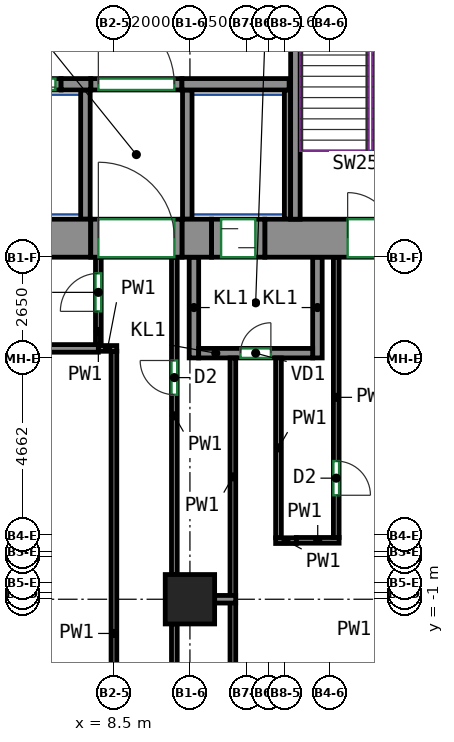
"""IFC4 building model, lengths in metres.
Left out: names, types, materials, properties, quantities, classifications, styles, units other than length and angle.
Written with IfcOpenShell. Run it as: python <this file> out.ifc"""

import sys

from ifc_helpers import new_model, si_unit, direction, frame, frame_2d, origin, origin_2d, place, context, subcontext, project, spatial, rectangle, extrude, source, transform, mapped, element, fill, save


model = new_model("IFC4")
c1 = context("Model", 3, precision=1e-05, world=origin(), true_north=direction((0.0, 1.0)))
c2 = subcontext(c1, "Body", "Model", "MODEL_VIEW")
j1 = project(units=[si_unit("LENGTHUNIT", "METRE"), si_unit("PLANEANGLEUNIT", "RADIAN")], contexts=[c1])
p1 = place(None, origin())
s1 = spatial("IfcSite", under=j1, at=p1, CompositionType="ELEMENT")
p2 = place(p1, origin())
s2 = spatial("IfcBuilding", under=s1, at=p2, CompositionType="ELEMENT")
p3 = place(p2, frame((0.0, 0.0, 47.0)))
s3 = spatial("IfcBuildingStorey", under=s2, at=p3, CompositionType="ELEMENT", Elevation=47.0)
m1 = source(origin(), c2, "Body", "SweptSolid", [
    extrude(rectangle(XDim=1.3, YDim=1.3, at=origin_2d()), origin(), (0.0, 0.0, 1.0), 3.72),
])
p4 = place(p3, frame((10.5, -1.0, 0.0), z_axis=(0.0, 0.0, 1.0), x_axis=(1.0, 0.0, 0.0)))
e1 = element("IfcColumn", 1, at=p4, inside=s3, PredefinedType="COLUMN", context=c2, shape_type="MappedRepresentation", body=[
    mapped(m1, transform((0.0, 0.0, 0.0))),
])
m2 = source(origin(), c2, "Body", "SweptSolid", [
    extrude(rectangle(XDim=14.18, YDim=1.0, at=frame_2d((7.09, 0.0))), origin(), (0.0, 0.0, 1.0), 3.72),
])
p5 = place(p3, frame((-6.29, 8.5, 0.0), z_axis=(0.0, 0.0, 1.0), x_axis=(1.0, 0.0, 0.0)))
e2 = element("IfcWall", 2, at=p5, inside=s3, PredefinedType="SHEAR", context=c2, shape_type="MappedRepresentation", body=[
    mapped(m2, transform((0.0, 0.0, 0.0))),
])
m3 = source(origin(), c2, "Body", "SweptSolid", [
    extrude(rectangle(XDim=0.78, YDim=1.0, at=frame_2d((0.39, 0.0))), origin(), (0.0, 0.0, 1.0), 3.72),
])
p6 = place(p3, frame((10.29, 8.5, 0.0), z_axis=(0.0, 0.0, 1.0), x_axis=(1.0, 0.0, 0.0)))
e3 = element("IfcWall", 3, at=p6, inside=s3, PredefinedType="SHEAR", context=c2, shape_type="MappedRepresentation", body=[
    mapped(m3, transform((0.0, 0.0, 0.0))),
])
m4 = source(origin(), c2, "Body", "SweptSolid", [
    extrude(rectangle(XDim=5.63, YDim=1.0, at=frame_2d((2.815, 0.0))), origin(), (0.0, 0.0, 1.0), 3.72),
])
p7 = place(p3, frame((12.47, 8.5, 0.0), z_axis=(0.0, 0.0, 1.0), x_axis=(1.0, 0.0, 0.0)))
e4 = element("IfcWall", 4, at=p7, inside=s3, PredefinedType="SHEAR", context=c2, shape_type="MappedRepresentation", body=[
    mapped(m4, transform((0.0, 0.0, 0.0))),
])
p8 = place(p7, frame((2.18, 0.0, 0.0)))
e5 = element("IfcOpeningElement", 5, at=p8, cuts=e4, PredefinedType="OPENING", context=c2, shape_type="SweptSolid", body=[
    extrude(rectangle(XDim=1.2, YDim=2.1, at=frame_2d((0.6, 1.05))), frame((0.0, 0.51, 0.0), z_axis=(0.0, -1.0, 0.0), x_axis=(1.0, 0.0, 0.0)), (0.0, 0.0, 1.0), 1.02),
])
m5 = source(origin(), c2, "Body", "SweptSolid", [
    extrude(rectangle(XDim=7.75, YDim=0.25, at=frame_2d((3.875, 0.0))), origin(), (0.0, 0.0, 1.0), 3.72),
])
p9 = place(p3, frame((13.275, 9.0, 0.0), z_axis=(0.0, 0.0, 1.0), x_axis=(0.0, 1.0, 0.0)))
e6 = element("IfcWall", 6, at=p9, inside=s3, PredefinedType="SHEAR", context=c2, shape_type="MappedRepresentation", body=[
    mapped(m5, transform((0.0, 0.0, 0.0))),
])
m6 = source(origin(), c2, "Body", "SweptSolid", [
    extrude(rectangle(XDim=0.78, YDim=0.3, at=frame_2d((0.39, 0.0))), origin(), (0.0, 0.0, 1.0), 3.72),
])
p10 = place(p3, frame((7.11, 12.55, 0.0), z_axis=(0.0, 0.0, 1.0), x_axis=(1.0, 0.0, 0.0)))
e7 = element("IfcWall", 7, at=p10, inside=s3, PredefinedType="SHEAR", context=c2, shape_type="MappedRepresentation", body=[
    mapped(m6, transform((0.0, 0.0, 0.0))),
])
m7 = source(origin(), c2, "Body", "SweptSolid", [
    extrude(rectangle(XDim=2.82, YDim=0.3, at=frame_2d((1.41, 0.0))), origin(), (0.0, 0.0, 1.0), 3.72),
])
p11 = place(p3, frame((10.29, 12.55, 0.0), z_axis=(0.0, 0.0, 1.0), x_axis=(1.0, 0.0, 0.0)))
e8 = element("IfcWall", 8, at=p11, inside=s3, PredefinedType="SHEAR", context=c2, shape_type="MappedRepresentation", body=[
    mapped(m7, transform((0.0, 0.0, 0.0))),
])
m8 = source(origin(), c2, "Body", "SweptSolid", [
    extrude(rectangle(XDim=1.4, YDim=0.3, at=frame_2d((0.7, 0.0))), origin(), (0.0, 0.0, 1.0), 3.72),
])
p12 = place(p3, frame((5.71, 12.55, 0.0), z_axis=(0.0, 0.0, 1.0), x_axis=(1.0, 0.0, 0.0)))
e9 = element("IfcWall", 9, at=p12, inside=s3, PredefinedType="PARTITIONING", context=c2, shape_type="MappedRepresentation", body=[
    mapped(m8, transform((0.0, 0.0, 0.0))),
])
p13 = place(p12, frame((0.15, 0.0, 0.0)))
e10 = element("IfcOpeningElement", 10, at=p13, cuts=e9, PredefinedType="OPENING", context=c2, shape_type="SweptSolid", body=[
    extrude(rectangle(XDim=1.1, YDim=2.1, at=frame_2d((0.55, 1.05))), frame((0.0, 0.16, 0.0), z_axis=(0.0, -1.0, 0.0), x_axis=(1.0, 0.0, 0.0)), (0.0, 0.0, 1.0), 0.32),
])
m9 = source(origin(), c2, "Body", "SweptSolid", [
    extrude(rectangle(XDim=2.4, YDim=0.3, at=frame_2d((1.2, 0.0))), origin(), (0.0, 0.0, 1.0), 3.72),
])
p14 = place(p3, frame((7.89, 12.55, 0.0), z_axis=(0.0, 0.0, 1.0), x_axis=(1.0, 0.0, 0.0)))
e11 = element("IfcWall", 11, at=p14, inside=s3, PredefinedType="PARTITIONING", context=c2, shape_type="MappedRepresentation", body=[
    mapped(m9, transform((0.0, 0.0, 0.0))),
])
p15 = place(p14, frame((0.2, 0.0, 0.0)))
e12 = element("IfcOpeningElement", 12, at=p15, cuts=e11, PredefinedType="OPENING", context=c2, shape_type="SweptSolid", body=[
    extrude(rectangle(XDim=2.0, YDim=2.1, at=frame_2d((1.0, 1.05))), frame((0.0, 0.16, 0.0), z_axis=(0.0, -1.0, 0.0), x_axis=(1.0, 0.0, 0.0)), (0.0, 0.0, 1.0), 0.32),
])
m10 = source(origin(), c2, "Body", "SweptSolid", [
    extrude(rectangle(XDim=2.65, YDim=0.25, at=frame_2d((1.325, 0.0))), origin(), (0.0, 0.0, 1.0), 3.72),
])
for number, where, z_axis, x_axis in (
    (13, (10.605, 5.35, 0.0), (0.0, 0.0, 1.0), (0.0, 1.0, 0.0)),
    (14, (13.855, 5.35, 0.0), (0.0, 0.0, 1.0), (0.0, 1.0, 0.0)),
):
    element("IfcWall", number, at=place(p3, frame(where, z_axis=z_axis, x_axis=x_axis)), inside=s3, PredefinedType="PARTITIONING", context=c2, shape_type="MappedRepresentation", body=[
        mapped(m10, transform((0.0, 0.0, 0.0))),
    ])
m11 = source(origin(), c2, "Body", "SweptSolid", [
    extrude(rectangle(XDim=3.0, YDim=0.25, at=frame_2d((1.5, 0.0))), origin(), (0.0, 0.0, 1.0), 3.72),
])
p16 = place(p3, frame((10.73, 5.475, 0.0), z_axis=(0.0, 0.0, 1.0), x_axis=(1.0, 0.0, 0.0)))
e15 = element("IfcWall", 15, at=p16, inside=s3, PredefinedType="PARTITIONING", context=c2, shape_type="MappedRepresentation", body=[
    mapped(m11, transform((0.0, 0.0, 0.0))),
])
p17 = place(p16, frame((1.1, 0.0, 0.0)))
e16 = element("IfcOpeningElement", 16, at=p17, cuts=e15, PredefinedType="OPENING", context=c2, shape_type="SweptSolid", body=[
    extrude(rectangle(XDim=0.8, YDim=2.0, at=frame_2d((0.4, 1.0))), frame((0.0, 0.135, 0.0), z_axis=(0.0, -1.0, 0.0), x_axis=(1.0, 0.0, 0.0)), (0.0, 0.0, 1.0), 0.27),
])
m12 = source(origin(), c2, "Body", "SweptSolid", [
    extrude(rectangle(XDim=3.4, YDim=0.25, at=frame_2d((1.7, 0.0))), origin(), (0.0, 0.0, 1.0), 3.72),
])
p18 = place(p3, frame((10.43, 9.0, 0.0), z_axis=(0.0, 0.0, 1.0), x_axis=(0.0, 1.0, 0.0)))
e17 = element("IfcWall", 17, at=p18, inside=s3, PredefinedType="PARTITIONING", context=c2, shape_type="MappedRepresentation", body=[
    mapped(m12, transform((0.0, 0.0, 0.0))),
])
m13 = source(origin(), c2, "Body", "SweptSolid", [
    extrude(rectangle(XDim=3.4, YDim=0.165, at=frame_2d((1.7, 0.0))), origin(), (0.0, 0.0, 1.0), 3.72),
])
p19 = place(p3, frame((13.067, 9.0, 0.0), z_axis=(0.0, 0.0, 1.0), x_axis=(0.0, 1.0, 0.0)))
e18 = element("IfcWall", 18, at=p19, inside=s3, PredefinedType="PARTITIONING", context=c2, shape_type="MappedRepresentation", body=[
    mapped(m13, transform((0.0, 0.0, 0.0))),
])
p20 = place(p3, frame((7.75, 9.0, 0.0), z_axis=(0.0, 0.0, 1.0), x_axis=(0.0, 1.0, 0.0)))
e19 = element("IfcWall", 19, at=p20, inside=s3, PredefinedType="PARTITIONING", context=c2, shape_type="MappedRepresentation", body=[
    mapped(m12, transform((0.0, 0.0, 0.0))),
])
m14 = source(origin(), c2, "Body", "SweptSolid", [
    extrude(rectangle(XDim=2.4, YDim=1.0, at=frame_2d((1.2, 0.0))), origin(), (0.0, 0.0, 1.0), 2.7),
])
p21 = place(p3, frame((7.89, 8.5, 0.0), z_axis=(0.0, 0.0, 1.0), x_axis=(1.0, 0.0, 0.0)))
e20 = element("IfcWall", 20, at=p21, inside=s3, PredefinedType="PARTITIONING", context=c2, shape_type="MappedRepresentation", body=[
    mapped(m14, transform((0.0, 0.0, 0.0))),
])
p22 = place(p21, frame((0.2, 0.0, 0.0)))
e21 = element("IfcOpeningElement", 21, at=p22, cuts=e20, PredefinedType="OPENING", context=c2, shape_type="SweptSolid", body=[
    extrude(rectangle(XDim=2.0, YDim=2.1, at=frame_2d((1.0, 1.05))), frame((0.0, 0.51, 0.0), z_axis=(0.0, -1.0, 0.0), x_axis=(1.0, 0.0, 0.0)), (0.0, 0.0, 1.0), 1.02),
])
m15 = source(origin(), c2, "Body", "SweptSolid", [
    extrude(rectangle(XDim=1.4, YDim=1.0, at=frame_2d((0.7, 0.0))), origin(), (0.0, 0.0, 1.0), 2.7),
])
p23 = place(p3, frame((11.07, 8.5, 0.0), z_axis=(0.0, 0.0, 1.0), x_axis=(1.0, 0.0, 0.0)))
e22 = element("IfcWall", 22, at=p23, inside=s3, PredefinedType="PARTITIONING", context=c2, shape_type="MappedRepresentation", body=[
    mapped(m15, transform((0.0, 0.0, 0.0))),
])
p24 = place(p23, frame((0.25, 0.0, 0.0)))
e23 = element("IfcOpeningElement", 23, at=p24, cuts=e22, PredefinedType="OPENING", context=c2, shape_type="SweptSolid", body=[
    extrude(rectangle(XDim=0.9, YDim=2.1, at=frame_2d((0.45, 1.05))), frame((0.0, 0.51, 0.0), z_axis=(0.0, -1.0, 0.0), x_axis=(1.0, 0.0, 0.0)), (0.0, 0.0, 1.0), 1.02),
])
p25 = place(p3, frame((10.09, -9.35, 0.0), z_axis=(0.0, 0.0, 1.0), x_axis=(0.0, 1.0, 0.0)))
e24 = element("IfcWall", 24, at=p25, inside=s3, PredefinedType="PARTITIONING", context=c2, shape_type="SweptSolid", body=[
    extrude(rectangle(XDim=7.7, YDim=0.15, at=frame_2d((3.85, 0.0))), origin(), (0.0, 0.0, 1.0), 3.72),
])
p26 = place(p3, frame((11.63, -14.125, 0.0), z_axis=(0.0, 0.0, 1.0), x_axis=(0.0, 1.0, 0.0)))
e25 = element("IfcWall", 25, at=p26, inside=s3, PredefinedType="PARTITIONING", context=c2, shape_type="SweptSolid", body=[
    extrude(rectangle(XDim=13.035, YDim=0.15, at=frame_2d((6.518, 0.0))), origin(), (0.0, 0.0, 1.0), 3.72),
])
p27 = place(p26, frame((2.507, 0.0, 0.0)))
e26 = element("IfcOpeningElement", 26, at=p27, cuts=e25, PredefinedType="OPENING", context=c2, shape_type="SweptSolid", body=[
    extrude(rectangle(XDim=0.9, YDim=2.1, at=frame_2d((0.45, 1.05))), frame((0.0, 0.085, 0.0), z_axis=(0.0, -1.0, 0.0), x_axis=(1.0, 0.0, 0.0)), (0.0, 0.0, 1.0), 0.17),
])
p28 = place(p3, frame((10.09, -0.35, 0.0), z_axis=(0.0, 0.0, 1.0), x_axis=(0.0, 1.0, 0.0)))
e27 = element("IfcWall", 27, at=p28, inside=s3, PredefinedType="PARTITIONING", context=c2, shape_type="SweptSolid", body=[
    extrude(rectangle(XDim=8.35, YDim=0.15, at=frame_2d((4.175, 0.0))), origin(), (0.0, 0.0, 1.0), 3.72),
])
p29 = place(p28, frame((4.732, 0.0, 0.0)))
e28 = element("IfcOpeningElement", 28, at=p29, cuts=e27, PredefinedType="OPENING", context=c2, shape_type="SweptSolid", body=[
    extrude(rectangle(XDim=0.9, YDim=2.1, at=frame_2d((0.45, 1.05))), frame((0.0, 0.085, 0.0), z_axis=(0.0, -1.0, 0.0), x_axis=(1.0, 0.0, 0.0)), (0.0, 0.0, 1.0), 0.17),
])
p30 = place(p3, frame((11.63, -0.91, 0.0), z_axis=(0.0, 0.0, 1.0), x_axis=(0.0, 1.0, 0.0)))
e29 = element("IfcWall", 29, at=p30, inside=s3, PredefinedType="PARTITIONING", context=c2, shape_type="SweptSolid", body=[
    extrude(rectangle(XDim=6.26, YDim=0.15, at=frame_2d((3.13, 0.0))), origin(), (0.0, 0.0, 1.0), 3.72),
])
p31 = place(p3, frame((12.83, 0.617, 0.0), z_axis=(0.0, 0.0, 1.0), x_axis=(0.0, 1.0, 0.0)))
e30 = element("IfcWall", 30, at=p31, inside=s3, PredefinedType="PARTITIONING", context=c2, shape_type="SweptSolid", body=[
    extrude(rectangle(XDim=4.733, YDim=0.15, at=frame_2d((2.367, 0.0))), origin(), (0.0, 0.0, 1.0), 3.72),
])
p32 = place(p3, frame((13.3, 0.542, 0.0), z_axis=(0.0, 0.0, 1.0), x_axis=(-1.0, 0.0, 0.0)))
e31 = element("IfcWall", 31, at=p32, inside=s3, PredefinedType="PARTITIONING", context=c2, shape_type="SweptSolid", body=[
    extrude(rectangle(XDim=0.545, YDim=0.15, at=frame_2d((0.272, 0.0))), origin(), (0.0, 0.0, 1.0), 3.72),
])
p33 = place(p3, frame((13.3, 0.55, 0.0), z_axis=(0.0, 0.0, 1.0), x_axis=(1.0, 0.0, 0.0)))
e32 = element("IfcWall", 32, at=p33, inside=s3, PredefinedType="PARTITIONING", context=c2, shape_type="SweptSolid", body=[
    extrude(rectangle(XDim=1.125, YDim=0.15, at=frame_2d((0.562, 0.0))), origin(), (0.0, 0.0, 1.0), 3.72),
])
p34 = place(p3, frame((14.35, 8.0, 0.0), z_axis=(0.0, 0.0, 1.0), x_axis=(0.0, -1.0, 0.0)))
e33 = element("IfcWall", 33, at=p34, inside=s3, PredefinedType="PARTITIONING", context=c2, shape_type="SweptSolid", body=[
    extrude(rectangle(XDim=7.375, YDim=0.15, at=frame_2d((3.688, 0.0))), origin(), (0.0, 0.0, 1.0), 3.72),
])
p35 = place(p34, frame((5.364, 0.0, 0.0)))
e34 = element("IfcOpeningElement", 34, at=p35, cuts=e33, PredefinedType="OPENING", context=c2, shape_type="SweptSolid", body=[
    extrude(rectangle(XDim=0.9, YDim=2.1, at=frame_2d((0.45, 1.05))), frame((0.0, 0.085, 0.0), z_axis=(0.0, -1.0, 0.0), x_axis=(1.0, 0.0, 0.0)), (0.0, 0.0, 1.0), 0.17),
])
p36 = place(p3, frame((8.09, 5.7, 0.0), z_axis=(0.0, 0.0, 1.0), x_axis=(0.0, 1.0, 0.0)))
e35 = element("IfcWall", 35, at=p36, inside=s3, PredefinedType="PARTITIONING", context=c2, shape_type="SweptSolid", body=[
    extrude(rectangle(XDim=2.3, YDim=0.15, at=frame_2d((1.15, 0.0))), origin(), (0.0, 0.0, 1.0), 3.72),
])
p37 = place(p36, frame((0.875, 0.0, 0.0)))
e36 = element("IfcOpeningElement", 36, at=p37, cuts=e35, PredefinedType="OPENING", context=c2, shape_type="SweptSolid", body=[
    extrude(rectangle(XDim=1.0, YDim=2.1, at=frame_2d((0.5, 1.05))), frame((0.0, 0.085, 0.0), z_axis=(0.0, -1.0, 0.0), x_axis=(1.0, 0.0, 0.0)), (0.0, 0.0, 1.0), 0.17),
])
p38 = place(p3, frame((8.5, 5.525, 0.0), z_axis=(0.0, 0.0, 1.0), x_axis=(0.0, -1.0, 0.0)))
e37 = element("IfcWall", 37, at=p38, inside=s3, PredefinedType="PARTITIONING", context=c2, shape_type="SweptSolid", body=[
    extrude(rectangle(XDim=14.85, YDim=0.15, at=frame_2d((7.425, 0.0))), origin(), (0.0, 0.0, 1.0), 3.72),
])
p39 = place(p38, frame((9.334, 0.0, 0.0)))
e38 = element("IfcOpeningElement", 38, at=p39, cuts=e37, PredefinedType="OPENING", context=c2, shape_type="SweptSolid", body=[
    extrude(rectangle(XDim=1.0, YDim=2.1, at=frame_2d((0.5, 1.05))), frame((0.0, 0.085, 0.0), z_axis=(0.0, -1.0, 0.0), x_axis=(1.0, 0.0, 0.0)), (0.0, 0.0, 1.0), 0.17),
])
p40 = place(p3, frame((8.09, 5.6, 0.0), z_axis=(0.0, 0.0, 1.0), x_axis=(1.0, 0.0, 0.0)))
e39 = element("IfcWall", 39, at=p40, inside=s3, PredefinedType="PARTITIONING", context=c2, shape_type="SweptSolid", body=[
    extrude(rectangle(XDim=0.485, YDim=0.15, at=frame_2d((0.242, 0.0))), origin(), (0.0, 0.0, 1.0), 3.72),
])
p41 = place(p3, frame((11.15, -1.0, 0.0), z_axis=(0.0, 0.0, 1.0), x_axis=(1.0, 0.0, 0.0)))
e40 = element("IfcWall", 40, at=p41, inside=s3, PredefinedType="PARTITIONING", context=c2, shape_type="SweptSolid", body=[
    extrude(rectangle(XDim=0.554, YDim=0.2, at=frame_2d((0.277, 0.0))), origin(), (0.0, 0.0, 1.0), 3.72),
])
p42 = place(p3, frame((-5.4, 5.6, 0.0), z_axis=(0.0, 0.0, 1.0), x_axis=(1.0, 0.0, 0.0)))
e41 = element("IfcWall", 41, at=p42, inside=s3, PredefinedType="PARTITIONING", context=c2, shape_type="SweptSolid", body=[
    extrude(rectangle(XDim=13.489, YDim=0.2, at=frame_2d((6.745, 0.0))), origin(), (0.0, 0.0, 1.0), 3.72),
])
p43 = place(p15, origin())
e42 = element("IfcDoor", 42, at=p43, inside=s3, OperationType="DOUBLE_DOOR_SINGLE_SWING", PredefinedType="DOOR", context=c2, shape_type="SweptSolid", body=[
    extrude(rectangle(XDim=2.0, YDim=2.1, at=frame_2d((1.0, 1.05))), frame((0.0, 0.025, 0.0), z_axis=(0.0, -1.0, 0.0), x_axis=(1.0, 0.0, 0.0)), (0.0, 0.0, 1.0), 0.05),
])
fill(e12, e42)
p44 = place(p22, origin())
e43 = element("IfcDoor", 43, at=p44, inside=s3, OperationType="DOUBLE_DOOR_SINGLE_SWING", PredefinedType="DOOR", context=c2, shape_type="SweptSolid", body=[
    extrude(rectangle(XDim=2.0, YDim=2.1, at=frame_2d((1.0, 1.05))), frame((0.0, 0.405, 0.0), z_axis=(0.0, -1.0, 0.0), x_axis=(1.0, 0.0, 0.0)), (0.0, 0.0, 1.0), 0.05),
])
fill(e21, e43)
p45 = place(p17, origin())
e44 = element("IfcDoor", 44, at=p45, inside=s3, OperationType="SINGLE_SWING_RIGHT", PredefinedType="DOOR", context=c2, shape_type="SweptSolid", body=[
    extrude(rectangle(XDim=0.8, YDim=2.0, at=frame_2d((0.4, 1.0))), frame((0.0, 0.025, 0.0), z_axis=(0.0, -1.0, 0.0), x_axis=(1.0, 0.0, 0.0)), (0.0, 0.0, 1.0), 0.05),
])
fill(e16, e44)
p46 = place(p24, origin())
e45 = element("IfcDoor", 45, at=p46, inside=s3, OperationType="SLIDING_TO_LEFT", PredefinedType="DOOR", context=c2, shape_type="SweptSolid", body=[
    extrude(rectangle(XDim=0.9, YDim=2.1, at=frame_2d((0.45, 1.05))), frame((0.0, 0.405, 0.0), z_axis=(0.0, -1.0, 0.0), x_axis=(1.0, 0.0, 0.0)), (0.0, 0.0, 1.0), 0.05),
])
fill(e23, e45)
p47 = place(p13, origin())
e46 = element("IfcDoor", 46, at=p47, inside=s3, OperationType="DOUBLE_DOOR_SLIDING", PredefinedType="DOOR", context=c2, shape_type="SweptSolid", body=[
    extrude(rectangle(XDim=1.1, YDim=2.1, at=frame_2d((0.55, 1.05))), frame((0.0, 0.025, 0.0), z_axis=(0.0, -1.0, 0.0), x_axis=(1.0, 0.0, 0.0)), (0.0, 0.0, 1.0), 0.05),
])
fill(e10, e46)
p48 = place(p8, origin())
e47 = element("IfcDoor", 47, at=p48, inside=s3, OperationType="DOUBLE_DOOR_SINGLE_SWING", PredefinedType="DOOR", context=c2, shape_type="SweptSolid", body=[
    extrude(rectangle(XDim=1.2, YDim=2.1, at=frame_2d((0.6, 1.05))), frame((0.0, 0.405, 0.0), z_axis=(0.0, -1.0, 0.0), x_axis=(1.0, 0.0, 0.0)), (0.0, 0.0, 1.0), 0.05),
])
fill(e5, e47)
p49 = place(p35, origin())
e48 = element("IfcDoor", 48, at=p49, inside=s3, OperationType="SINGLE_SWING_RIGHT", PredefinedType="DOOR", context=c2, shape_type="SweptSolid", body=[
    extrude(rectangle(XDim=0.9, YDim=2.1, at=frame_2d((0.45, 1.05))), frame((0.0, 0.025, 0.0), z_axis=(0.0, -1.0, 0.0), x_axis=(1.0, 0.0, 0.0)), (0.0, 0.0, 1.0), 0.05),
])
fill(e34, e48)
p50 = place(p29, origin())
e49 = element("IfcDoor", 49, at=p50, inside=s3, OperationType="SINGLE_SWING_RIGHT", PredefinedType="DOOR", context=c2, shape_type="SweptSolid", body=[
    extrude(rectangle(XDim=0.9, YDim=2.1, at=frame_2d((0.45, 1.05))), frame((0.0, 0.025, 0.0), z_axis=(0.0, -1.0, 0.0), x_axis=(1.0, 0.0, 0.0)), (0.0, 0.0, 1.0), 0.05),
])
fill(e28, e49)
p51 = place(p37, origin())
e50 = element("IfcDoor", 50, at=p51, inside=s3, OperationType="SINGLE_SWING_LEFT", PredefinedType="DOOR", context=c2, shape_type="SweptSolid", body=[
    extrude(rectangle(XDim=1.0, YDim=2.1, at=frame_2d((0.5, 1.05))), frame((0.0, 0.025, 0.0), z_axis=(0.0, -1.0, 0.0), x_axis=(1.0, 0.0, 0.0)), (0.0, 0.0, 1.0), 0.05),
])
fill(e36, e50)
save(model, sys.argv[1])
